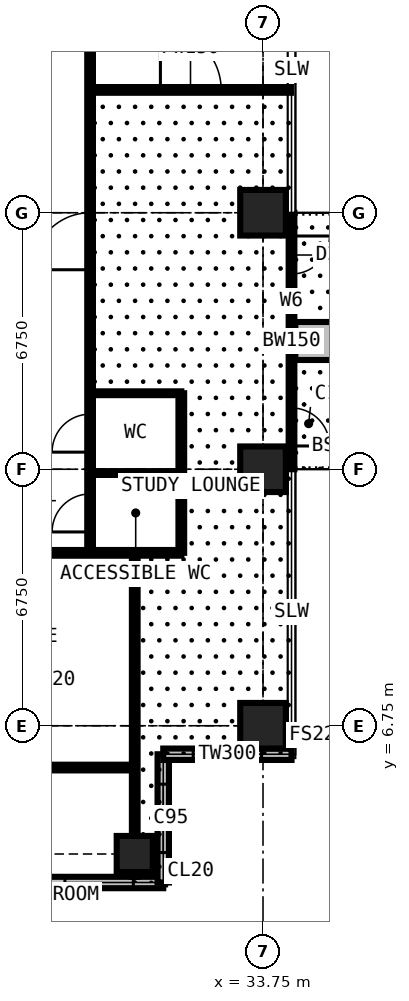
"""IFC4 building model, lengths in metres.
Left out: names, types, materials, properties, quantities, classifications, styles, units other than length and angle.
Written with IfcOpenShell. Run it as: python <this file> out.ifc"""

import sys

from ifc_helpers import new_model, si_unit, direction, frame, frame_2d, origin, origin_2d, place, context, subcontext, project, spatial, rectangle, extrude, element, fill, save


model = new_model("IFC4")
c1 = context("Model", 3, precision=1e-05, world=origin(), true_north=direction((0.0, 1.0)))
c2 = subcontext(c1, "Body", "Model", "MODEL_VIEW")
j1 = project(units=[si_unit("LENGTHUNIT", "METRE"), si_unit("PLANEANGLEUNIT", "RADIAN")], contexts=[c1])
p1 = place(None, origin())
s1 = spatial("IfcSite", under=j1, at=p1, CompositionType="ELEMENT")
p2 = place(p1, origin())
s2 = spatial("IfcBuilding", under=s1, at=p2, CompositionType="ELEMENT")
p3 = place(p2, frame((0.0, 0.0, 171.0)))
s3 = spatial("IfcBuildingStorey", under=s2, at=p3, CompositionType="ELEMENT", Elevation=171.0)
p4 = place(p3, frame((30.375, 3.375, 0.0), z_axis=(0.0, 0.0, 1.0), x_axis=(1.0, 0.0, 0.0)))
e1 = element("IfcColumn", 1, at=p4, inside=s3, PredefinedType="COLUMN", context=c2, shape_type="SweptSolid", body=[
    extrude(rectangle(XDim=0.95, YDim=0.95, at=origin_2d()), origin(), (0.0, 0.0, 1.0), 3.6),
])
for number, where, z_axis, x_axis in (
    (2, (33.75, 6.75, 0.0), (0.0, 0.0, 1.0), (1.0, 0.0, 0.0)),
    (3, (33.75, 13.5, 0.0), (0.0, 0.0, 1.0), (1.0, 0.0, 0.0)),
    (4, (33.75, 20.25, 0.0), (0.0, 0.0, 1.0), (1.0, 0.0, 0.0)),
):
    element("IfcColumn", number, at=place(p3, frame(where, z_axis=z_axis, x_axis=x_axis)), inside=s3, PredefinedType="COLUMN", context=c2, shape_type="SweptSolid", body=[
        extrude(rectangle(XDim=1.2, YDim=1.2, at=origin_2d()), origin(), (0.0, 0.0, 1.0), 3.6),
    ])
p5 = place(p3, frame((34.5, 20.25, 0.0), z_axis=(0.0, 0.0, 1.0), x_axis=(0.0, -1.0, 0.0)))
e5 = element("IfcWall", 5, at=p5, inside=s3, PredefinedType="SOLIDWALL", context=c2, shape_type="SweptSolid", body=[
    extrude(rectangle(XDim=6.75, YDim=0.15, at=frame_2d((3.375, 0.0))), origin(), (0.0, 0.0, 1.0), 3.375),
])
p6 = place(p5, frame((0.613, 0.0, 0.0)))
e6 = element("IfcOpeningElement", 6, at=p6, cuts=e5, PredefinedType="OPENING", context=c2, shape_type="SweptSolid", body=[
    extrude(rectangle(XDim=1.0, YDim=2.2, at=frame_2d((0.5, 1.1))), frame((0.0, 0.085, 0.0), z_axis=(0.0, -1.0, 0.0), x_axis=(1.0, 0.0, 0.0)), (0.0, 0.0, 1.0), 0.17),
])
p7 = place(p5, frame((1.725, 0.0, 0.9)))
e7 = element("IfcOpeningElement", 7, at=p7, cuts=e5, PredefinedType="OPENING", context=c2, shape_type="SweptSolid", body=[
    extrude(rectangle(XDim=1.2, YDim=1.8, at=frame_2d((0.6, 0.9))), frame((0.0, 0.085, 0.0), z_axis=(0.0, -1.0, 0.0), x_axis=(1.0, 0.0, 0.0)), (0.0, 0.0, 1.0), 0.17),
])
p8 = place(p5, frame((5.137, 0.0, 0.0)))
e8 = element("IfcOpeningElement", 8, at=p8, cuts=e5, PredefinedType="OPENING", context=c2, shape_type="SweptSolid", body=[
    extrude(rectangle(XDim=1.0, YDim=2.2, at=frame_2d((0.5, 1.1))), frame((0.0, 0.085, 0.0), z_axis=(0.0, -1.0, 0.0), x_axis=(1.0, 0.0, 0.0)), (0.0, 0.0, 1.0), 0.17),
])
p9 = place(p5, frame((3.825, 0.0, 0.9)))
e9 = element("IfcOpeningElement", 9, at=p9, cuts=e5, PredefinedType="OPENING", context=c2, shape_type="SweptSolid", body=[
    extrude(rectangle(XDim=1.2, YDim=1.8, at=frame_2d((0.6, 0.9))), frame((0.0, 0.085, 0.0), z_axis=(0.0, -1.0, 0.0), x_axis=(1.0, 0.0, 0.0)), (0.0, 0.0, 1.0), 0.17),
])
p10 = place(p3, frame((27.75, 2.625, 0.0), z_axis=(0.0, 0.0, 1.0), x_axis=(1.0, 0.0, 0.0)))
e10 = element("IfcWall", 10, at=p10, inside=s3, PredefinedType="SOLIDWALL", context=c2, shape_type="SweptSolid", body=[
    extrude(rectangle(XDim=3.375, YDim=0.3, at=frame_2d((1.688, 0.0))), origin(), (0.0, 0.0, 1.0), 3.375),
])
p11 = place(p10, frame((0.788, 0.0, 0.6)))
e11 = element("IfcOpeningElement", 11, at=p11, cuts=e10, PredefinedType="OPENING", context=c2, shape_type="SweptSolid", body=[
    extrude(rectangle(XDim=1.8, YDim=2.1, at=frame_2d((0.9, 1.05))), frame((0.0, 0.16, 0.0), z_axis=(0.0, -1.0, 0.0), x_axis=(1.0, 0.0, 0.0)), (0.0, 0.0, 1.0), 0.32),
])
p12 = place(p3, frame((31.125, 2.625, 0.0), z_axis=(0.0, 0.0, 1.0), x_axis=(0.0, 1.0, 0.0)))
e12 = element("IfcWall", 12, at=p12, inside=s3, PredefinedType="SOLIDWALL", context=c2, shape_type="SweptSolid", body=[
    extrude(rectangle(XDim=3.375, YDim=0.3, at=frame_2d((1.688, 0.0))), origin(), (0.0, 0.0, 1.0), 3.375),
])
p13 = place(p12, frame((0.788, 0.0, 0.6)))
e13 = element("IfcOpeningElement", 13, at=p13, cuts=e12, PredefinedType="OPENING", context=c2, shape_type="SweptSolid", body=[
    extrude(rectangle(XDim=1.8, YDim=2.1, at=frame_2d((0.9, 1.05))), frame((0.0, 0.16, 0.0), z_axis=(0.0, -1.0, 0.0), x_axis=(1.0, 0.0, 0.0)), (0.0, 0.0, 1.0), 0.32),
])
p14 = place(p3, frame((31.125, 6.0, 0.0), z_axis=(0.0, 0.0, 1.0), x_axis=(1.0, 0.0, 0.0)))
e14 = element("IfcWall", 14, at=p14, inside=s3, PredefinedType="SOLIDWALL", context=c2, shape_type="SweptSolid", body=[
    extrude(rectangle(XDim=3.375, YDim=0.3, at=frame_2d((1.688, 0.0))), origin(), (0.0, 0.0, 1.0), 3.375),
])
p15 = place(p14, frame((0.788, 0.0, 0.6)))
e15 = element("IfcOpeningElement", 15, at=p15, cuts=e14, PredefinedType="OPENING", context=c2, shape_type="SweptSolid", body=[
    extrude(rectangle(XDim=1.8, YDim=2.1, at=frame_2d((0.9, 1.05))), frame((0.0, 0.16, 0.0), z_axis=(0.0, -1.0, 0.0), x_axis=(1.0, 0.0, 0.0)), (0.0, 0.0, 1.0), 0.32),
])
p16 = place(p3, frame((34.6, 16.875, 0.0), z_axis=(0.0, 0.0, 1.0), x_axis=(1.0, 0.0, 0.0)))
e16 = element("IfcWall", 16, at=p16, inside=s3, PredefinedType="USERDEFINED", context=c2, shape_type="SweptSolid", body=[
    extrude(rectangle(XDim=2.2, YDim=1.0, at=frame_2d((1.1, 0.0))), origin(), (0.0, 0.0, 1.0), 0.9),
])
p17 = place(p3, frame((10.125, 11.3, 0.0), z_axis=(0.0, 0.0, 1.0), x_axis=(1.0, 0.0, 0.0)))
e17 = element("IfcWall", 17, at=p17, inside=s3, PredefinedType="PARTITIONING", context=c2, shape_type="SweptSolid", body=[
    extrude(rectangle(XDim=21.475, YDim=0.15, at=frame_2d((10.738, 0.0))), origin(), (0.0, 0.0, 1.0), 3.375),
])
p18 = place(p17, frame((11.312, 0.0, 0.0)))
e18 = element("IfcOpeningElement", 18, at=p18, cuts=e17, PredefinedType="OPENING", context=c2, shape_type="SweptSolid", body=[
    extrude(rectangle(XDim=1.0, YDim=2.2, at=frame_2d((0.5, 1.1))), frame((0.0, 0.085, 0.0), z_axis=(0.0, -1.0, 0.0), x_axis=(1.0, 0.0, 0.0)), (0.0, 0.0, 1.0), 0.17),
])
p19 = place(p3, frame((22.988, 5.65, 0.0), z_axis=(0.0, 0.0, 1.0), x_axis=(1.0, 0.0, 0.0)))
e19 = element("IfcWall", 19, at=p19, inside=s3, PredefinedType="PARTITIONING", context=c2, shape_type="SweptSolid", body=[
    extrude(rectangle(XDim=7.387, YDim=0.15, at=frame_2d((3.694, 0.0))), origin(), (0.0, 0.0, 1.0), 3.375),
])
p20 = place(p19, frame((2.45, 0.0, 0.0)))
e20 = element("IfcOpeningElement", 20, at=p20, cuts=e19, PredefinedType="OPENING", context=c2, shape_type="SweptSolid", body=[
    extrude(rectangle(XDim=0.95, YDim=2.2, at=frame_2d((0.475, 1.1))), frame((0.0, 0.085, 0.0), z_axis=(0.0, -1.0, 0.0), x_axis=(1.0, 0.0, 0.0)), (0.0, 0.0, 1.0), 0.17),
])
p21 = place(p3, frame((29.2, 11.3, 0.0), z_axis=(0.0, 0.0, 1.0), x_axis=(0.0, 1.0, 0.0)))
e21 = element("IfcWall", 21, at=p21, inside=s3, PredefinedType="PARTITIONING", context=c2, shape_type="SweptSolid", body=[
    extrude(rectangle(XDim=19.809, YDim=0.15, at=frame_2d((9.904, 0.0))), origin(), (0.0, 0.0, 1.0), 3.375),
])
p22 = place(p21, frame((0.55, 0.0, 0.0)))
e22 = element("IfcOpeningElement", 22, at=p22, cuts=e21, PredefinedType="OPENING", context=c2, shape_type="SweptSolid", body=[
    extrude(rectangle(XDim=1.0, YDim=2.2, at=frame_2d((0.5, 1.1))), frame((0.0, 0.085, 0.0), z_axis=(0.0, -1.0, 0.0), x_axis=(1.0, 0.0, 0.0)), (0.0, 0.0, 1.0), 0.17),
])
p23 = place(p21, frame((2.65, 0.0, 0.0)))
e23 = element("IfcOpeningElement", 23, at=p23, cuts=e21, PredefinedType="OPENING", context=c2, shape_type="SweptSolid", body=[
    extrude(rectangle(XDim=1.0, YDim=2.2, at=frame_2d((0.5, 1.1))), frame((0.0, 0.085, 0.0), z_axis=(0.0, -1.0, 0.0), x_axis=(1.0, 0.0, 0.0)), (0.0, 0.0, 1.0), 0.17),
])
p24 = place(p21, frame((7.45, 0.0, 0.0)))
e24 = element("IfcOpeningElement", 24, at=p24, cuts=e21, PredefinedType="OPENING", context=c2, shape_type="SweptSolid", body=[
    extrude(rectangle(XDim=1.5, YDim=2.2, at=frame_2d((0.75, 1.1))), frame((0.0, 0.085, 0.0), z_axis=(0.0, -1.0, 0.0), x_axis=(1.0, 0.0, 0.0)), (0.0, 0.0, 1.0), 0.17),
])
p25 = place(p3, frame((29.2, 13.4, 0.0), z_axis=(0.0, 0.0, 1.0), x_axis=(1.0, 0.0, 0.0)))
e25 = element("IfcWall", 25, at=p25, inside=s3, PredefinedType="PARTITIONING", context=c2, shape_type="SweptSolid", body=[
    extrude(rectangle(XDim=2.4, YDim=0.1, at=frame_2d((1.2, 0.0))), origin(), (0.0, 0.0, 1.0), 2.806),
])
p26 = place(p3, frame((29.2, 15.5, 0.0), z_axis=(0.0, 0.0, 1.0), x_axis=(1.0, 0.0, 0.0)))
e26 = element("IfcWall", 26, at=p26, inside=s3, PredefinedType="PARTITIONING", context=c2, shape_type="SweptSolid", body=[
    extrude(rectangle(XDim=2.4, YDim=0.1, at=frame_2d((1.2, 0.0))), origin(), (0.0, 0.0, 1.0), 3.375),
])
p27 = place(p3, frame((29.2, 23.482, 0.0), z_axis=(0.0, 0.0, 1.0), x_axis=(1.0, 0.0, 0.0)))
e27 = element("IfcWall", 27, at=p27, inside=s3, PredefinedType="PARTITIONING", context=c2, shape_type="SweptSolid", body=[
    extrude(rectangle(XDim=5.284, YDim=0.15, at=frame_2d((2.642, 0.0))), origin(), (0.0, 0.0, 1.0), 3.375),
])
p28 = place(p27, frame((1.85, 0.0, 0.0)))
e28 = element("IfcOpeningElement", 28, at=p28, cuts=e27, PredefinedType="OPENING", context=c2, shape_type="SweptSolid", body=[
    extrude(rectangle(XDim=1.6, YDim=2.4, at=frame_2d((0.8, 1.2))), frame((0.0, 0.085, 0.0), z_axis=(0.0, -1.0, 0.0), x_axis=(1.0, 0.0, 0.0)), (0.0, 0.0, 1.0), 0.17),
])
p29 = place(p3, frame((30.375, 2.775, 0.0), z_axis=(0.0, 0.0, 1.0), x_axis=(0.0, 1.0, 0.0)))
e29 = element("IfcWall", 29, at=p29, inside=s3, PredefinedType="PARTITIONING", context=c2, shape_type="SweptSolid", body=[
    extrude(rectangle(XDim=8.525, YDim=0.15, at=frame_2d((4.263, 0.0))), origin(), (0.0, 0.0, 1.0), 2.877),
])
p30 = place(p3, frame((31.6, 11.3, 0.0), z_axis=(0.0, 0.0, 1.0), x_axis=(0.0, 1.0, 0.0)))
e30 = element("IfcWall", 30, at=p30, inside=s3, PredefinedType="PARTITIONING", context=c2, shape_type="SweptSolid", body=[
    extrude(rectangle(XDim=4.2, YDim=0.15, at=frame_2d((2.1, 0.0))), origin(), (0.0, 0.0, 1.0), 3.375),
])
p31 = place(p6, origin())
e31 = element("IfcDoor", 31, at=p31, inside=s3, OperationType="SINGLE_SWING_LEFT", PredefinedType="DOOR", context=c2, shape_type="SweptSolid", body=[
    extrude(rectangle(XDim=1.0, YDim=2.2, at=frame_2d((0.5, 1.1))), frame((0.0, 0.025, 0.0), z_axis=(0.0, -1.0, 0.0), x_axis=(1.0, 0.0, 0.0)), (0.0, 0.0, 1.0), 0.05),
])
fill(e6, e31)
p32 = place(p7, origin())
e32 = element("IfcWindow", 32, at=p32, inside=s3, PartitioningType="SINGLE_PANEL", PredefinedType="WINDOW", context=c2, shape_type="SweptSolid", body=[
    extrude(rectangle(XDim=1.2, YDim=1.8, at=frame_2d((0.6, 0.9))), frame((0.0, 0.03, 0.0), z_axis=(0.0, -1.0, 0.0), x_axis=(1.0, 0.0, 0.0)), (0.0, 0.0, 1.0), 0.06),
])
fill(e7, e32)
p33 = place(p8, origin())
e33 = element("IfcDoor", 33, at=p33, inside=s3, OperationType="SINGLE_SWING_RIGHT", PredefinedType="DOOR", context=c2, shape_type="SweptSolid", body=[
    extrude(rectangle(XDim=1.0, YDim=2.2, at=frame_2d((0.5, 1.1))), frame((0.0, 0.025, 0.0), z_axis=(0.0, -1.0, 0.0), x_axis=(1.0, 0.0, 0.0)), (0.0, 0.0, 1.0), 0.05),
])
fill(e8, e33)
p34 = place(p9, origin())
e34 = element("IfcWindow", 34, at=p34, inside=s3, PartitioningType="SINGLE_PANEL", PredefinedType="WINDOW", context=c2, shape_type="SweptSolid", body=[
    extrude(rectangle(XDim=1.2, YDim=1.8, at=frame_2d((0.6, 0.9))), frame((0.0, 0.03, 0.0), z_axis=(0.0, -1.0, 0.0), x_axis=(1.0, 0.0, 0.0)), (0.0, 0.0, 1.0), 0.06),
])
fill(e9, e34)
p35 = place(p11, origin())
e35 = element("IfcWindow", 35, at=p35, inside=s3, PartitioningType="SINGLE_PANEL", PredefinedType="WINDOW", context=c2, shape_type="SweptSolid", body=[
    extrude(rectangle(XDim=1.8, YDim=2.1, at=frame_2d((0.9, 1.05))), frame((0.0, 0.03, 0.0), z_axis=(0.0, -1.0, 0.0), x_axis=(1.0, 0.0, 0.0)), (0.0, 0.0, 1.0), 0.06),
])
fill(e11, e35)
p36 = place(p13, origin())
e36 = element("IfcWindow", 36, at=p36, inside=s3, PartitioningType="SINGLE_PANEL", PredefinedType="WINDOW", context=c2, shape_type="SweptSolid", body=[
    extrude(rectangle(XDim=1.8, YDim=2.1, at=frame_2d((0.9, 1.05))), frame((0.0, 0.03, 0.0), z_axis=(0.0, -1.0, 0.0), x_axis=(1.0, 0.0, 0.0)), (0.0, 0.0, 1.0), 0.06),
])
fill(e13, e36)
p37 = place(p15, origin())
e37 = element("IfcWindow", 37, at=p37, inside=s3, PartitioningType="SINGLE_PANEL", PredefinedType="WINDOW", context=c2, shape_type="SweptSolid", body=[
    extrude(rectangle(XDim=1.8, YDim=2.1, at=frame_2d((0.9, 1.05))), frame((0.0, 0.03, 0.0), z_axis=(0.0, -1.0, 0.0), x_axis=(1.0, 0.0, 0.0)), (0.0, 0.0, 1.0), 0.06),
])
fill(e15, e37)
p38 = place(p22, origin())
e38 = element("IfcDoor", 38, at=p38, inside=s3, OperationType="SINGLE_SWING_LEFT", PredefinedType="DOOR", context=c2, shape_type="SweptSolid", body=[
    extrude(rectangle(XDim=1.0, YDim=2.2, at=frame_2d((0.5, 1.1))), frame((0.0, 0.025, 0.0), z_axis=(0.0, -1.0, 0.0), x_axis=(1.0, 0.0, 0.0)), (0.0, 0.0, 1.0), 0.05),
])
fill(e22, e38)
p39 = place(p23, origin())
e39 = element("IfcDoor", 39, at=p39, inside=s3, OperationType="SINGLE_SWING_LEFT", PredefinedType="DOOR", context=c2, shape_type="SweptSolid", body=[
    extrude(rectangle(XDim=1.0, YDim=2.2, at=frame_2d((0.5, 1.1))), frame((0.0, 0.025, 0.0), z_axis=(0.0, -1.0, 0.0), x_axis=(1.0, 0.0, 0.0)), (0.0, 0.0, 1.0), 0.05),
])
fill(e23, e39)
p40 = place(p28, origin())
e40 = element("IfcDoor", 40, at=p40, inside=s3, OperationType="DOUBLE_DOOR_SINGLE_SWING", PredefinedType="DOOR", context=c2, shape_type="SweptSolid", body=[
    extrude(rectangle(XDim=1.6, YDim=2.4, at=frame_2d((0.8, 1.2))), frame((0.0, 0.025, 0.0), z_axis=(0.0, -1.0, 0.0), x_axis=(1.0, 0.0, 0.0)), (0.0, 0.0, 1.0), 0.05),
])
fill(e28, e40)
p41 = place(p24, origin())
e41 = element("IfcDoor", 41, at=p41, inside=s3, OperationType="DOUBLE_DOOR_SINGLE_SWING", PredefinedType="DOOR", context=c2, shape_type="SweptSolid", body=[
    extrude(rectangle(XDim=1.5, YDim=2.2, at=frame_2d((0.75, 1.1))), frame((0.0, 0.025, 0.0), z_axis=(0.0, -1.0, 0.0), x_axis=(1.0, 0.0, 0.0)), (0.0, 0.0, 1.0), 0.05),
])
fill(e24, e41)
save(model, sys.argv[1])
